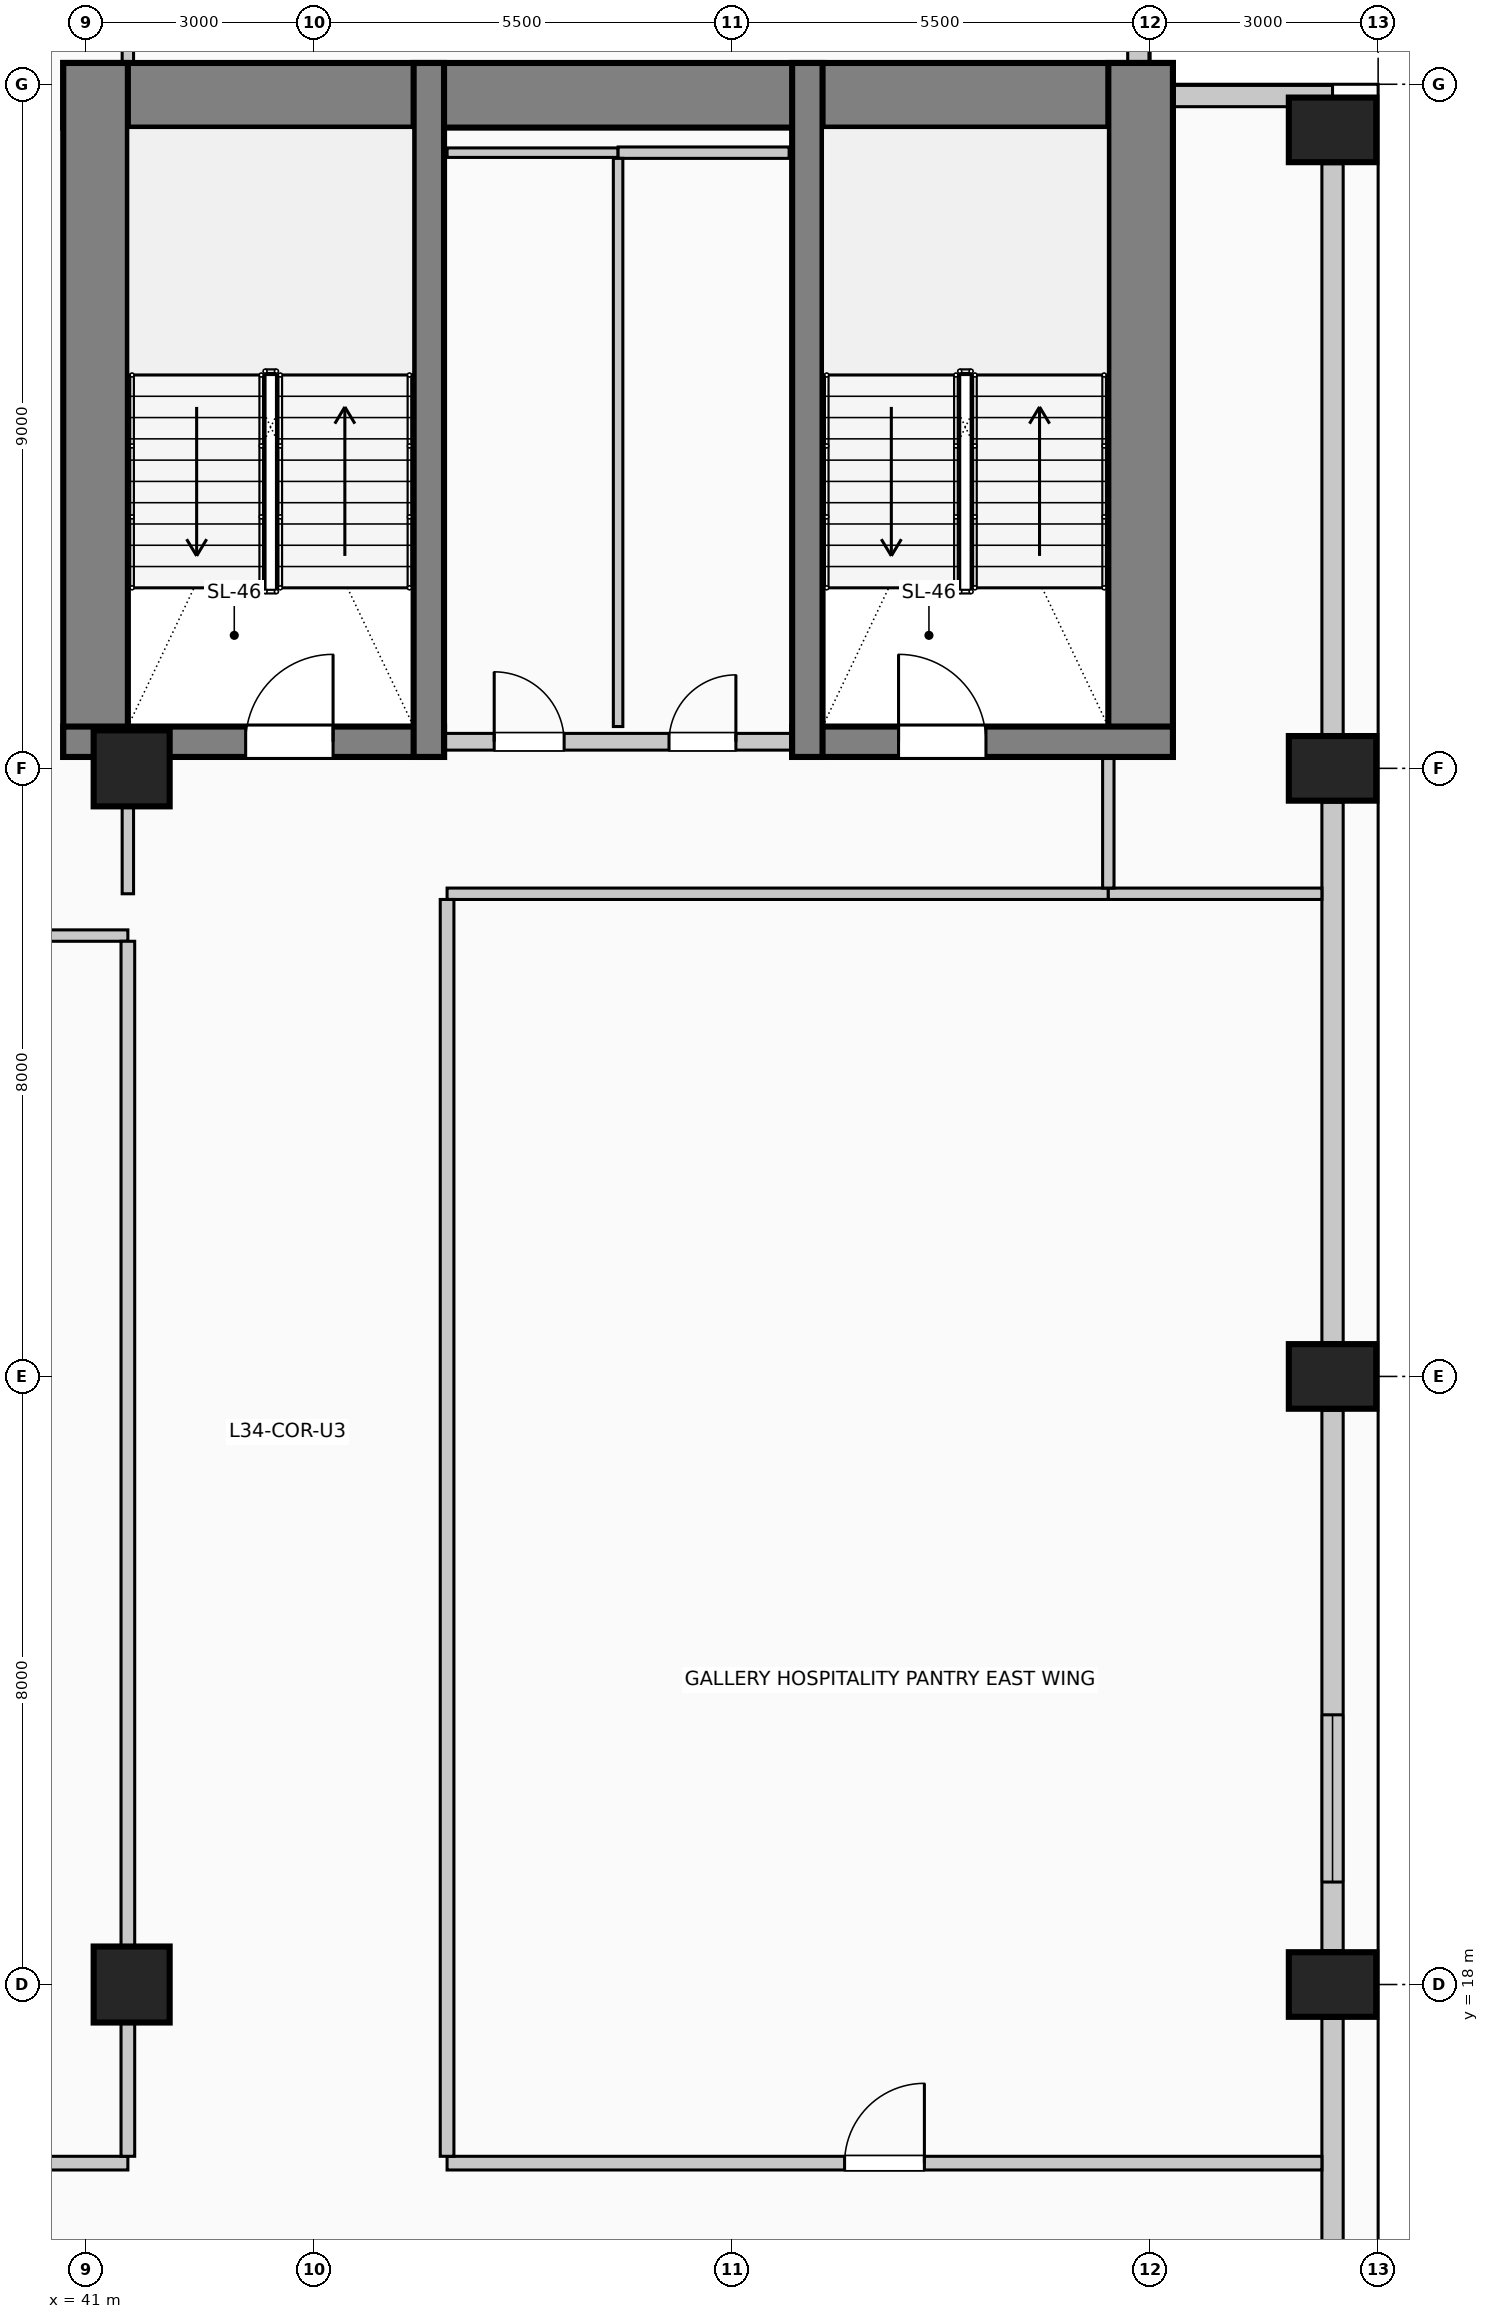
"""IFC4 building model, lengths in metres.
Left out: names, types, materials, properties, quantities, classifications, styles, units other than length and angle.
Written with IfcOpenShell. Run it as: python <this file> out.ifc"""

import sys

from ifc_helpers import new_model, si_unit, direction, frame, frame_2d, origin, origin_2d, place, context, subcontext, project, spatial, rectangle, circle, extrude, element, fill, save


model = new_model("IFC4")
c1 = context("Model", 3, precision=1e-05, world=origin(), true_north=direction((0.0, 1.0)))
c2 = subcontext(c1, "Body", "Model", "MODEL_VIEW")
j1 = project(units=[si_unit("LENGTHUNIT", "METRE"), si_unit("PLANEANGLEUNIT", "RADIAN")], contexts=[c1])
p1 = place(None, origin())
s1 = spatial("IfcSite", under=j1, at=p1, CompositionType="ELEMENT")
p2 = place(p1, origin())
s2 = spatial("IfcBuilding", under=s1, at=p2, CompositionType="ELEMENT")
p3 = place(p2, frame((0.0, 0.0, 140.6)))
s3 = spatial("IfcBuildingStorey", under=s2, at=p3, CompositionType="ELEMENT", Elevation=140.6)
p4 = place(p3, frame((40.7, 42.855, 0.0), z_axis=(0.0, 0.0, 1.0), x_axis=(1.0, 0.0, 0.0)))
e1 = element("IfcWall", 1, at=p4, inside=s3, PredefinedType="SHEAR", context=c2, shape_type="SweptSolid", body=[
    extrude(rectangle(XDim=14.6, YDim=0.85, at=frame_2d((7.3, 0.0))), origin(), (0.0, 0.0, 1.0), 4.0),
])
for number, where, z_axis, x_axis in (
    (2, (41.125, 34.15, 0.0), (0.0, 0.0, 1.0), (0.0, 1.0, 0.0)),
    (3, (54.875, 34.15, 0.0), (0.0, 0.0, 1.0), (0.0, 1.0, 0.0)),
):
    element("IfcWall", number, at=place(p3, frame(where, z_axis=z_axis, x_axis=x_axis)), inside=s3, PredefinedType="SHEAR", context=c2, shape_type="SweptSolid", body=[
        extrude(rectangle(XDim=9.13, YDim=0.85, at=frame_2d((4.565, 0.0))), origin(), (0.0, 0.0, 1.0), 4.0),
    ])
p5 = place(p3, frame((40.7, 34.35, 0.0), z_axis=(0.0, 0.0, 1.0), x_axis=(1.0, 0.0, 0.0)))
e4 = element("IfcWall", 4, at=p5, inside=s3, PredefinedType="SHEAR", context=c2, shape_type="SweptSolid", body=[
    extrude(rectangle(XDim=5.01, YDim=0.4, at=frame_2d((2.505, 0.0))), origin(), (0.0, 0.0, 1.0), 4.0),
])
p6 = place(p5, frame((2.4, 0.0, 0.0)))
e5 = element("IfcOpeningElement", 5, at=p6, cuts=e4, PredefinedType="OPENING", context=c2, shape_type="SweptSolid", body=[
    extrude(rectangle(XDim=1.15, YDim=2.2, at=frame_2d((0.575, 1.1))), frame((0.0, 0.21, 0.0), z_axis=(0.0, -1.0, 0.0), x_axis=(1.0, 0.0, 0.0)), (0.0, 0.0, 1.0), 0.42),
])
p7 = place(p3, frame((45.51, 34.15, 0.0), z_axis=(0.0, 0.0, 1.0), x_axis=(0.0, 1.0, 0.0)))
e6 = element("IfcWall", 6, at=p7, inside=s3, PredefinedType="SHEAR", context=c2, shape_type="SweptSolid", body=[
    extrude(rectangle(XDim=9.13, YDim=0.4, at=frame_2d((4.565, 0.0))), origin(), (0.0, 0.0, 1.0), 4.0),
])
p8 = place(p3, frame((50.29, 34.35, 0.0), z_axis=(0.0, 0.0, 1.0), x_axis=(1.0, 0.0, 0.0)))
e7 = element("IfcWall", 7, at=p8, inside=s3, PredefinedType="SHEAR", context=c2, shape_type="SweptSolid", body=[
    extrude(rectangle(XDim=5.01, YDim=0.4, at=frame_2d((2.505, 0.0))), origin(), (0.0, 0.0, 1.0), 4.0),
])
p9 = place(p8, frame((1.4, 0.0, 0.0)))
e8 = element("IfcOpeningElement", 8, at=p9, cuts=e7, PredefinedType="OPENING", context=c2, shape_type="SweptSolid", body=[
    extrude(rectangle(XDim=1.15, YDim=2.2, at=frame_2d((0.575, 1.1))), frame((0.0, 0.21, 0.0), z_axis=(0.0, -1.0, 0.0), x_axis=(1.0, 0.0, 0.0)), (0.0, 0.0, 1.0), 0.42),
])
p10 = place(p3, frame((50.49, 34.15, 0.0), z_axis=(0.0, 0.0, 1.0), x_axis=(0.0, 1.0, 0.0)))
e9 = element("IfcWall", 9, at=p10, inside=s3, PredefinedType="SHEAR", context=c2, shape_type="SweptSolid", body=[
    extrude(rectangle(XDim=9.13, YDim=0.4, at=frame_2d((4.565, 0.0))), origin(), (0.0, 0.0, 1.0), 4.0),
])
for number, where, z_axis, x_axis in (
    (10, (57.4, 18.0, 0.0), (0.0, 0.0, 1.0), (0.0, 1.0, 0.0)),
    (11, (57.4, 26.0, 0.0), (0.0, 0.0, 1.0), (0.0, 1.0, 0.0)),
    (12, (57.4, 34.0, 0.0), (0.0, 0.0, 1.0), (0.0, 1.0, 0.0)),
    (13, (57.4, 42.4, 0.0), (0.0, 0.0, 1.0), (0.0, 1.0, 0.0)),
):
    element("IfcColumn", number, at=place(p3, frame(where, z_axis=z_axis, x_axis=x_axis)), inside=s3, PredefinedType="COLUMN", context=c2, shape_type="SweptSolid", body=[
        extrude(rectangle(XDim=0.85, YDim=1.15, at=origin_2d()), origin(), (0.0, 0.0, 1.0), 4.0),
    ])
for number, where, z_axis, x_axis in (
    (14, (41.6, 18.0, 0.0), (0.0, 0.0, 1.0), (1.0, 0.0, 0.0)),
    (15, (41.6, 34.0, 0.0), (0.0, 0.0, 1.0), (1.0, 0.0, 0.0)),
):
    element("IfcColumn", number, at=place(p3, frame(where, z_axis=z_axis, x_axis=x_axis)), inside=s3, PredefinedType="COLUMN", context=c2, shape_type="SweptSolid", body=[
        extrude(circle(Radius=0.5, at=origin_2d()), origin(), (0.0, 0.0, 1.0), 4.0),
    ])
p11 = place(p3, frame((57.4, 17.555, 0.0), z_axis=(0.0, 0.0, 1.0), x_axis=(0.0, -1.0, 0.0)))
e16 = element("IfcWall", 16, at=p11, inside=s3, PredefinedType="SOLIDWALL", context=c2, shape_type="SweptSolid", body=[
    extrude(rectangle(XDim=7.11, YDim=0.28, at=frame_2d((3.555, 0.0))), origin(), (0.0, 0.0, 1.0), 2.875),
])
p12 = place(p3, frame((57.4, 25.555, 0.0), z_axis=(0.0, 0.0, 1.0), x_axis=(0.0, -1.0, 0.0)))
e17 = element("IfcWall", 17, at=p12, inside=s3, PredefinedType="SOLIDWALL", context=c2, shape_type="SweptSolid", body=[
    extrude(rectangle(XDim=7.11, YDim=0.28, at=frame_2d((3.555, 0.0))), origin(), (0.0, 0.0, 1.0), 2.875),
])
p13 = place(p12, frame((4.007, 0.0, 0.5)))
e18 = element("IfcOpeningElement", 18, at=p13, cuts=e17, PredefinedType="OPENING", context=c2, shape_type="SweptSolid", body=[
    extrude(rectangle(XDim=2.2, YDim=1.95, at=frame_2d((1.1, 0.975))), frame((0.0, 0.15, 0.0), z_axis=(0.0, -1.0, 0.0), x_axis=(1.0, 0.0, 0.0)), (0.0, 0.0, 1.0), 0.3),
])
p14 = place(p3, frame((57.4, 33.555, 0.0), z_axis=(0.0, 0.0, 1.0), x_axis=(0.0, -1.0, 0.0)))
e19 = element("IfcWall", 19, at=p14, inside=s3, PredefinedType="SOLIDWALL", context=c2, shape_type="SweptSolid", body=[
    extrude(rectangle(XDim=7.11, YDim=0.28, at=frame_2d((3.555, 0.0))), origin(), (0.0, 0.0, 1.0), 2.875),
])
p15 = place(p3, frame((57.4, 41.955, 0.0), z_axis=(0.0, 0.0, 1.0), x_axis=(0.0, -1.0, 0.0)))
e20 = element("IfcWall", 20, at=p15, inside=s3, PredefinedType="SOLIDWALL", context=c2, shape_type="SweptSolid", body=[
    extrude(rectangle(XDim=7.51, YDim=0.28, at=frame_2d((3.755, 0.0))), origin(), (0.0, 0.0, 1.0), 2.875),
])
p16 = place(p3, frame((54.845, 45.4, 0.0), z_axis=(0.0, 0.0, 1.0), x_axis=(0.0, -1.0, 0.0)))
e21 = element("IfcWall", 21, at=p16, inside=s3, PredefinedType="SOLIDWALL", context=c2, shape_type="SweptSolid", body=[
    extrude(rectangle(XDim=2.115, YDim=0.28, at=frame_2d((1.058, 0.0))), origin(), (0.0, 0.0, 1.0), 3.725),
])
p17 = place(p3, frame((55.305, 42.845, 0.0), z_axis=(0.0, 0.0, 1.0), x_axis=(1.0, 0.0, 0.0)))
e22 = element("IfcWall", 22, at=p17, inside=s3, PredefinedType="SOLIDWALL", context=c2, shape_type="SweptSolid", body=[
    extrude(rectangle(XDim=2.095, YDim=0.28, at=frame_2d((1.047, 0.0))), origin(), (0.0, 0.0, 1.0), 3.725),
])
p18 = place(p3, frame((45.72, 34.35, 0.0), z_axis=(0.0, 0.0, 1.0), x_axis=(1.0, 0.0, 0.0)))
e23 = element("IfcWall", 23, at=p18, inside=s3, PredefinedType="PARTITIONING", context=c2, shape_type="SweptSolid", body=[
    extrude(rectangle(XDim=4.56, YDim=0.22, at=frame_2d((2.28, 0.0))), origin(), (0.0, 0.0, 1.0), 3.725),
])
p19 = place(p18, frame((0.65, 0.0, 0.0)))
e24 = element("IfcOpeningElement", 24, at=p19, cuts=e23, PredefinedType="OPENING", context=c2, shape_type="SweptSolid", body=[
    extrude(rectangle(XDim=0.92, YDim=2.1, at=frame_2d((0.46, 1.05))), frame((0.0, 0.12, 0.0), z_axis=(0.0, -1.0, 0.0), x_axis=(1.0, 0.0, 0.0)), (0.0, 0.0, 1.0), 0.24),
])
p20 = place(p18, frame((2.95, 0.0, 0.0)))
e25 = element("IfcOpeningElement", 25, at=p20, cuts=e23, PredefinedType="OPENING", context=c2, shape_type="SweptSolid", body=[
    extrude(rectangle(XDim=0.88, YDim=2.1, at=frame_2d((0.44, 1.05))), frame((0.0, 0.12, 0.0), z_axis=(0.0, -1.0, 0.0), x_axis=(1.0, 0.0, 0.0)), (0.0, 0.0, 1.0), 0.24),
])
p21 = place(p3, frame((24.5, 15.65, 0.0), z_axis=(0.0, 0.0, 1.0), x_axis=(1.0, 0.0, 0.0)))
e26 = element("IfcWall", 26, at=p21, inside=s3, PredefinedType="PARTITIONING", context=c2, shape_type="SweptSolid", body=[
    extrude(rectangle(XDim=17.05, YDim=0.18, at=frame_2d((8.525, 0.0))), origin(), (0.0, 0.0, 1.0), 3.725),
])
p22 = place(p21, frame((8.05, 0.0, 0.0)))
e27 = element("IfcOpeningElement", 27, at=p22, cuts=e26, PredefinedType="OPENING", context=c2, shape_type="SweptSolid", body=[
    extrude(rectangle(XDim=0.95, YDim=2.15, at=frame_2d((0.475, 1.075))), frame((0.0, 0.1, 0.0), z_axis=(0.0, -1.0, 0.0), x_axis=(1.0, 0.0, 0.0)), (0.0, 0.0, 1.0), 0.2),
])
p23 = place(p3, frame((45.75, 15.65, 0.0), z_axis=(0.0, 0.0, 1.0), x_axis=(1.0, 0.0, 0.0)))
e28 = element("IfcWall", 28, at=p23, inside=s3, PredefinedType="PARTITIONING", context=c2, shape_type="SweptSolid", body=[
    extrude(rectangle(XDim=11.51, YDim=0.18, at=frame_2d((5.755, 0.0))), origin(), (0.0, 0.0, 1.0), 3.725),
])
p24 = place(p23, frame((5.23, 0.0, 0.0)))
e29 = element("IfcOpeningElement", 29, at=p24, cuts=e28, PredefinedType="OPENING", context=c2, shape_type="SweptSolid", body=[
    extrude(rectangle(XDim=1.05, YDim=2.15, at=frame_2d((0.525, 1.075))), frame((0.0, 0.1, 0.0), z_axis=(0.0, -1.0, 0.0), x_axis=(1.0, 0.0, 0.0)), (0.0, 0.0, 1.0), 0.2),
])
p25 = place(p3, frame((24.5, 31.8, 0.0), z_axis=(0.0, 0.0, 1.0), x_axis=(1.0, 0.0, 0.0)))
e30 = element("IfcWall", 30, at=p25, inside=s3, PredefinedType="PARTITIONING", context=c2, shape_type="SweptSolid", body=[
    extrude(rectangle(XDim=17.05, YDim=0.15, at=frame_2d((8.525, 0.0))), origin(), (0.0, 0.0, 1.0), 3.725),
])
p26 = place(p3, frame((45.75, 32.35, 0.0), z_axis=(0.0, 0.0, 1.0), x_axis=(1.0, 0.0, 0.0)))
e31 = element("IfcWall", 31, at=p26, inside=s3, PredefinedType="PARTITIONING", context=c2, shape_type="SweptSolid", body=[
    extrude(rectangle(XDim=8.7, YDim=0.15, at=frame_2d((4.35, 0.0))), origin(), (0.0, 0.0, 1.0), 3.725),
])
p27 = place(p3, frame((54.45, 32.35, 0.0), z_axis=(0.0, 0.0, 1.0), x_axis=(1.0, 0.0, 0.0)))
e32 = element("IfcWall", 32, at=p27, inside=s3, PredefinedType="PARTITIONING", context=c2, shape_type="SweptSolid", body=[
    extrude(rectangle(XDim=2.81, YDim=0.15, at=frame_2d((1.405, 0.0))), origin(), (0.0, 0.0, 1.0), 3.725),
])
p28 = place(p3, frame((45.75, 42.1, 0.0), z_axis=(0.0, 0.0, 1.0), x_axis=(1.0, 0.0, 0.0)))
e33 = element("IfcWall", 33, at=p28, inside=s3, PredefinedType="PARTITIONING", context=c2, shape_type="SweptSolid", body=[
    extrude(rectangle(XDim=2.25, YDim=0.125, at=frame_2d((1.125, 0.0))), origin(), (0.0, 0.0, 1.0), 3.725),
])
p29 = place(p3, frame((48.0, 42.1, 0.0), z_axis=(0.0, 0.0, 1.0), x_axis=(1.0, 0.0, 0.0)))
e34 = element("IfcWall", 34, at=p29, inside=s3, PredefinedType="PARTITIONING", context=c2, shape_type="SweptSolid", body=[
    extrude(rectangle(XDim=2.25, YDim=0.15, at=frame_2d((1.125, 0.0))), origin(), (0.0, 0.0, 1.0), 3.725),
])
p30 = place(p3, frame((41.55, 15.74, 0.0), z_axis=(0.0, 0.0, 1.0), x_axis=(0.0, 1.0, 0.0)))
e35 = element("IfcWall", 35, at=p30, inside=s3, PredefinedType="PARTITIONING", context=c2, shape_type="SweptSolid", body=[
    extrude(rectangle(XDim=1.76, YDim=0.18, at=frame_2d((0.88, 0.0))), origin(), (0.0, 0.0, 1.0), 3.07),
])
p31 = place(p3, frame((41.55, 18.5, 0.0), z_axis=(0.0, 0.0, 1.0), x_axis=(0.0, 1.0, 0.0)))
e36 = element("IfcWall", 36, at=p31, inside=s3, PredefinedType="PARTITIONING", context=c2, shape_type="SweptSolid", body=[
    extrude(rectangle(XDim=13.225, YDim=0.18, at=frame_2d((6.613, 0.0))), origin(), (0.0, 0.0, 1.0), 3.07),
])
p32 = place(p3, frame((41.55, 32.35, 0.0), z_axis=(0.0, 0.0, 1.0), x_axis=(0.0, 1.0, 0.0)))
e37 = element("IfcWall", 37, at=p32, inside=s3, PredefinedType="PARTITIONING", context=c2, shape_type="SweptSolid", body=[
    extrude(rectangle(XDim=1.15, YDim=0.15, at=frame_2d((0.575, 0.0))), origin(), (0.0, 0.0, 1.0), 3.07),
])
p33 = place(p3, frame((41.55, 43.28, 0.0), z_axis=(0.0, 0.0, 1.0), x_axis=(0.0, 1.0, 0.0)))
e38 = element("IfcWall", 38, at=p33, inside=s3, PredefinedType="PARTITIONING", context=c2, shape_type="SweptSolid", body=[
    extrude(rectangle(XDim=1.42, YDim=0.15, at=frame_2d((0.71, 0.0))), origin(), (0.0, 0.0, 1.0), 3.725),
])
p34 = place(p3, frame((45.75, 15.74, 0.0), z_axis=(0.0, 0.0, 1.0), x_axis=(0.0, 1.0, 0.0)))
e39 = element("IfcWall", 39, at=p34, inside=s3, PredefinedType="PARTITIONING", context=c2, shape_type="SweptSolid", body=[
    extrude(rectangle(XDim=16.535, YDim=0.18, at=frame_2d((8.268, 0.0))), origin(), (0.0, 0.0, 1.0), 3.725),
])
p35 = place(p3, frame((48.0, 34.55, 0.0), z_axis=(0.0, 0.0, 1.0), x_axis=(0.0, 1.0, 0.0)))
e40 = element("IfcWall", 40, at=p35, inside=s3, PredefinedType="PARTITIONING", context=c2, shape_type="SweptSolid", body=[
    extrude(rectangle(XDim=7.475, YDim=0.125, at=frame_2d((3.737, 0.0))), origin(), (0.0, 0.0, 1.0), 3.725),
])
p36 = place(p3, frame((54.45, 32.425, 0.0), z_axis=(0.0, 0.0, 1.0), x_axis=(0.0, 1.0, 0.0)))
e41 = element("IfcWall", 41, at=p36, inside=s3, PredefinedType="PARTITIONING", context=c2, shape_type="SweptSolid", body=[
    extrude(rectangle(XDim=1.725, YDim=0.15, at=frame_2d((0.862, 0.0))), origin(), (0.0, 0.0, 1.0), 3.725),
])
p37 = place(p13, origin())
e42 = element("IfcWindow", 42, at=p37, inside=s3, PartitioningType="SINGLE_PANEL", PredefinedType="WINDOW", context=c2, shape_type="SweptSolid", body=[
    extrude(rectangle(XDim=2.2, YDim=1.95, at=frame_2d((1.1, 0.975))), frame((0.0, 0.03, 0.0), z_axis=(0.0, -1.0, 0.0), x_axis=(1.0, 0.0, 0.0)), (0.0, 0.0, 1.0), 0.06),
])
fill(e18, e42)
p38 = place(p6, origin())
e43 = element("IfcDoor", 43, at=p38, inside=s3, OperationType="SINGLE_SWING_RIGHT", PredefinedType="DOOR", context=c2, shape_type="SweptSolid", body=[
    extrude(rectangle(XDim=1.15, YDim=2.2, at=frame_2d((0.575, 1.1))), frame((0.0, 0.025, 0.0), z_axis=(0.0, -1.0, 0.0), x_axis=(1.0, 0.0, 0.0)), (0.0, 0.0, 1.0), 0.05),
])
fill(e5, e43)
p39 = place(p19, origin())
e44 = element("IfcDoor", 44, at=p39, inside=s3, OperationType="SINGLE_SWING_LEFT", PredefinedType="DOOR", context=c2, shape_type="SweptSolid", body=[
    extrude(rectangle(XDim=0.92, YDim=2.1, at=frame_2d((0.46, 1.05))), frame((0.0, 0.025, 0.0), z_axis=(0.0, -1.0, 0.0), x_axis=(1.0, 0.0, 0.0)), (0.0, 0.0, 1.0), 0.05),
])
fill(e24, e44)
p40 = place(p20, origin())
e45 = element("IfcDoor", 45, at=p40, inside=s3, OperationType="SINGLE_SWING_RIGHT", PredefinedType="DOOR", context=c2, shape_type="SweptSolid", body=[
    extrude(rectangle(XDim=0.88, YDim=2.1, at=frame_2d((0.44, 1.05))), frame((0.0, 0.025, 0.0), z_axis=(0.0, -1.0, 0.0), x_axis=(1.0, 0.0, 0.0)), (0.0, 0.0, 1.0), 0.05),
])
fill(e25, e45)
p41 = place(p9, origin())
e46 = element("IfcDoor", 46, at=p41, inside=s3, OperationType="SINGLE_SWING_LEFT", PredefinedType="DOOR", context=c2, shape_type="SweptSolid", body=[
    extrude(rectangle(XDim=1.15, YDim=2.2, at=frame_2d((0.575, 1.1))), frame((0.0, 0.025, 0.0), z_axis=(0.0, -1.0, 0.0), x_axis=(1.0, 0.0, 0.0)), (0.0, 0.0, 1.0), 0.05),
])
fill(e8, e46)
p42 = place(p24, origin())
e47 = element("IfcDoor", 47, at=p42, inside=s3, OperationType="SINGLE_SWING_RIGHT", PredefinedType="DOOR", context=c2, shape_type="SweptSolid", body=[
    extrude(rectangle(XDim=1.05, YDim=2.15, at=frame_2d((0.525, 1.075))), frame((0.0, 0.025, 0.0), z_axis=(0.0, -1.0, 0.0), x_axis=(1.0, 0.0, 0.0)), (0.0, 0.0, 1.0), 0.05),
])
fill(e29, e47)
save(model, sys.argv[1])
